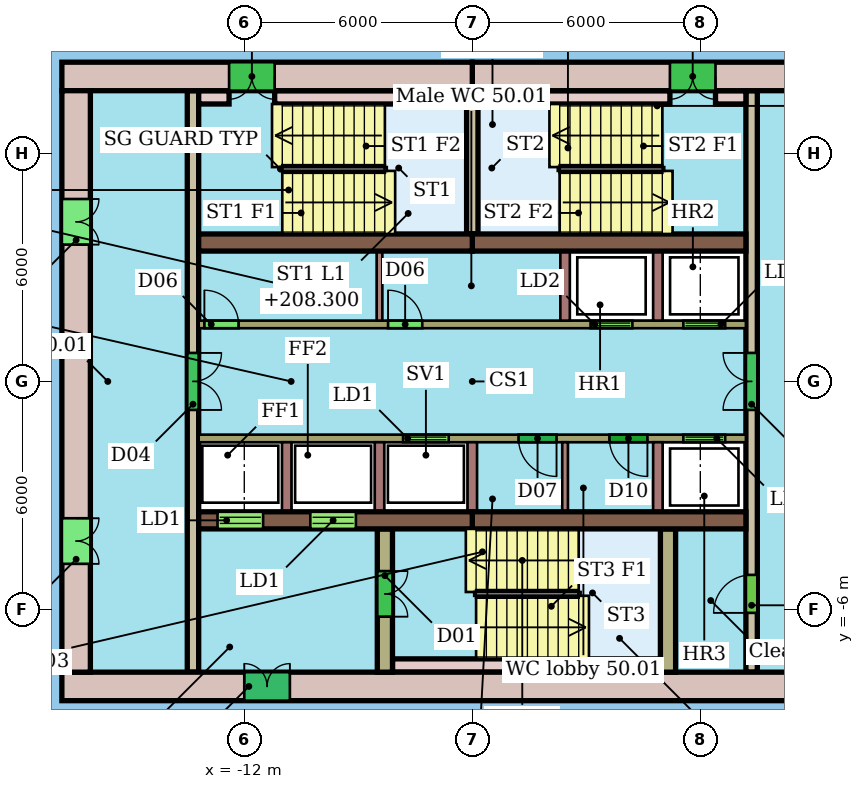
"""IFC4 building model, lengths in metres.
Left out: names, types, materials, properties, quantities, classifications, styles, units other than length and angle.
Written with IfcOpenShell. Run it as: python <this file> out.ifc"""

import sys

from ifc_helpers import new_model, si_unit, direction, frame, frame_2d, origin, place, context, subcontext, project, spatial, rectangle, extrude, element, fill, save


model = new_model("IFC4")
c1 = context("Model", 3, precision=1e-05, world=origin(), true_north=direction((0.0, 1.0)))
c2 = subcontext(c1, "Body", "Model", "MODEL_VIEW")
j1 = project(units=[si_unit("LENGTHUNIT", "METRE"), si_unit("PLANEANGLEUNIT", "RADIAN")], contexts=[c1])
p1 = place(None, origin())
s1 = spatial("IfcSite", under=j1, at=p1, CompositionType="ELEMENT")
p2 = place(p1, origin())
s2 = spatial("IfcBuilding", under=s1, at=p2, CompositionType="ELEMENT")
p3 = place(p2, frame((0.0, 0.0, 206.5)))
s3 = spatial("IfcBuildingStorey", under=s2, at=p3, CompositionType="ELEMENT", Elevation=206.5)
p4 = place(p3, frame((4.8, 8.025, 0.0), z_axis=(0.0, 0.0, 1.0), x_axis=(-1.0, 0.0, 0.0)))
e1 = element("IfcWall", 1, at=p4, inside=s3, PredefinedType="SHEAR", context=c2, shape_type="SweptSolid", body=[
    extrude(rectangle(XDim=10.8, YDim=0.75, at=frame_2d((5.4, 0.0))), origin(), (0.0, 0.0, 1.0), 3.3),
])
p5 = place(p4, frame((4.4, 0.0, 0.0)))
e2 = element("IfcOpeningElement", 2, at=p5, cuts=e1, PredefinedType="OPENING", context=c2, shape_type="SweptSolid", body=[
    extrude(rectangle(XDim=1.2, YDim=2.1, at=frame_2d((0.6, 1.05))), frame((0.0, 0.385, 0.0), z_axis=(0.0, -1.0, 0.0), x_axis=(1.0, 0.0, 0.0)), (0.0, 0.0, 1.0), 0.77),
])
p6 = place(p3, frame((-6.0, 8.025, 0.0), z_axis=(0.0, 0.0, 1.0), x_axis=(-1.0, 0.0, 0.0)))
e3 = element("IfcWall", 3, at=p6, inside=s3, PredefinedType="SHEAR", context=c2, shape_type="SweptSolid", body=[
    extrude(rectangle(XDim=10.8, YDim=0.75, at=frame_2d((5.4, 0.0))), origin(), (0.0, 0.0, 1.0), 3.3),
])
p7 = place(p6, frame((5.2, 0.0, 0.0)))
e4 = element("IfcOpeningElement", 4, at=p7, cuts=e3, PredefinedType="OPENING", context=c2, shape_type="SweptSolid", body=[
    extrude(rectangle(XDim=1.2, YDim=2.1, at=frame_2d((0.6, 1.05))), frame((0.0, 0.385, 0.0), z_axis=(0.0, -1.0, 0.0), x_axis=(1.0, 0.0, 0.0)), (0.0, 0.0, 1.0), 0.77),
])
p8 = place(p3, frame((-16.8, -8.025, 0.0), z_axis=(0.0, 0.0, 1.0), x_axis=(1.0, 0.0, 0.0)))
e5 = element("IfcWall", 5, at=p8, inside=s3, PredefinedType="SHEAR", context=c2, shape_type="SweptSolid", body=[
    extrude(rectangle(XDim=21.6, YDim=0.75, at=frame_2d((10.8, 0.0))), origin(), (0.0, 0.0, 1.0), 3.3),
])
p9 = place(p8, frame((4.8, 0.0, 0.0)))
e6 = element("IfcOpeningElement", 6, at=p9, cuts=e5, PredefinedType="OPENING", context=c2, shape_type="SweptSolid", body=[
    extrude(rectangle(XDim=1.2, YDim=2.1, at=frame_2d((0.6, 1.05))), frame((0.0, 0.385, 0.0), z_axis=(0.0, -1.0, 0.0), x_axis=(1.0, 0.0, 0.0)), (0.0, 0.0, 1.0), 0.77),
])
p10 = place(p3, frame((-16.425, 7.65, 0.0), z_axis=(0.0, 0.0, 1.0), x_axis=(0.0, -1.0, 0.0)))
e7 = element("IfcWall", 7, at=p10, inside=s3, PredefinedType="SHEAR", context=c2, shape_type="SweptSolid", body=[
    extrude(rectangle(XDim=15.3, YDim=0.75, at=frame_2d((7.65, 0.0))), origin(), (0.0, 0.0, 1.0), 3.3),
])
p11 = place(p10, frame((11.25, 0.0, 0.0)))
e8 = element("IfcOpeningElement", 8, at=p11, cuts=e7, PredefinedType="OPENING", context=c2, shape_type="SweptSolid", body=[
    extrude(rectangle(XDim=1.2, YDim=2.1, at=frame_2d((0.6, 1.05))), frame((0.0, 0.385, 0.0), z_axis=(0.0, -1.0, 0.0), x_axis=(1.0, 0.0, 0.0)), (0.0, 0.0, 1.0), 0.77),
])
p12 = place(p10, frame((2.85, 0.0, 0.0)))
e9 = element("IfcOpeningElement", 9, at=p12, cuts=e7, PredefinedType="OPENING", context=c2, shape_type="SweptSolid", body=[
    extrude(rectangle(XDim=1.2, YDim=2.1, at=frame_2d((0.6, 1.05))), frame((0.0, 0.385, 0.0), z_axis=(0.0, -1.0, 0.0), x_axis=(1.0, 0.0, 0.0)), (0.0, 0.0, 1.0), 0.77),
])
for number, where, z_axis, x_axis in (
    (10, (-13.2, 3.655, 0.0), (0.0, 0.0, 1.0), (1.0, 0.0, 0.0)),
    (11, (-6.0, 3.655, 0.0), (0.0, 0.0, 1.0), (1.0, 0.0, 0.0)),
):
    element("IfcWall", number, at=place(p3, frame(where, z_axis=z_axis, x_axis=x_axis)), inside=s3, PredefinedType="SHEAR", context=c2, shape_type="SweptSolid", body=[
        extrude(rectangle(XDim=7.2, YDim=0.45, at=frame_2d((3.6, 0.0))), origin(), (0.0, 0.0, 1.0), 3.3),
    ])
p13 = place(p3, frame((-13.2, -3.655, 0.0), z_axis=(0.0, 0.0, 1.0), x_axis=(1.0, 0.0, 0.0)))
e12 = element("IfcWall", 12, at=p13, inside=s3, PredefinedType="SHEAR", context=c2, shape_type="SweptSolid", body=[
    extrude(rectangle(XDim=7.2, YDim=0.45, at=frame_2d((3.6, 0.0))), origin(), (0.0, 0.0, 1.0), 3.3),
])
p14 = place(p13, frame((0.496, 0.0, 0.0)))
e13 = element("IfcOpeningElement", 13, at=p14, cuts=e12, PredefinedType="OPENING", context=c2, shape_type="SweptSolid", body=[
    extrude(rectangle(XDim=1.2, YDim=2.1, at=frame_2d((0.6, 1.05))), frame((0.0, 0.235, 0.0), z_axis=(0.0, -1.0, 0.0), x_axis=(1.0, 0.0, 0.0)), (0.0, 0.0, 1.0), 0.47),
])
p15 = place(p13, frame((2.938, 0.0, 0.0)))
e14 = element("IfcOpeningElement", 14, at=p15, cuts=e12, PredefinedType="OPENING", context=c2, shape_type="SweptSolid", body=[
    extrude(rectangle(XDim=1.2, YDim=2.1, at=frame_2d((0.6, 1.05))), frame((0.0, 0.235, 0.0), z_axis=(0.0, -1.0, 0.0), x_axis=(1.0, 0.0, 0.0)), (0.0, 0.0, 1.0), 0.47),
])
p16 = place(p3, frame((-6.0, -3.655, 0.0), z_axis=(0.0, 0.0, 1.0), x_axis=(1.0, 0.0, 0.0)))
e15 = element("IfcWall", 15, at=p16, inside=s3, PredefinedType="SHEAR", context=c2, shape_type="SweptSolid", body=[
    extrude(rectangle(XDim=7.2, YDim=0.45, at=frame_2d((3.6, 0.0))), origin(), (0.0, 0.0, 1.0), 3.3),
])
p17 = place(p3, frame((-13.35, 7.65, 0.0), z_axis=(0.0, 0.0, 1.0), x_axis=(0.0, -1.0, 0.0)))
e16 = element("IfcWall", 16, at=p17, inside=s3, PredefinedType="SHEAR", context=c2, shape_type="SweptSolid", body=[
    extrude(rectangle(XDim=15.3, YDim=0.3, at=frame_2d((7.65, 0.0))), origin(), (0.0, 0.0, 1.0), 3.3),
])
p18 = place(p17, frame((6.9, 0.0, 0.0)))
e17 = element("IfcOpeningElement", 17, at=p18, cuts=e16, PredefinedType="OPENING", context=c2, shape_type="SweptSolid", body=[
    extrude(rectangle(XDim=1.5, YDim=2.1, at=frame_2d((0.75, 1.05))), frame((0.0, 0.16, 0.0), z_axis=(0.0, -1.0, 0.0), x_axis=(1.0, 0.0, 0.0)), (0.0, 0.0, 1.0), 0.32),
])
p19 = place(p3, frame((1.35, -7.65, 0.0), z_axis=(0.0, 0.0, 1.0), x_axis=(0.0, 1.0, 0.0)))
e18 = element("IfcWall", 18, at=p19, inside=s3, PredefinedType="SHEAR", context=c2, shape_type="SweptSolid", body=[
    extrude(rectangle(XDim=15.3, YDim=0.3, at=frame_2d((7.65, 0.0))), origin(), (0.0, 0.0, 1.0), 3.3),
])
p20 = place(p19, frame((1.56, 0.0, 0.0)))
e19 = element("IfcOpeningElement", 19, at=p20, cuts=e18, PredefinedType="OPENING", context=c2, shape_type="SweptSolid", body=[
    extrude(rectangle(XDim=1.0, YDim=2.1, at=frame_2d((0.5, 1.05))), frame((0.0, 0.16, 0.0), z_axis=(0.0, -1.0, 0.0), x_axis=(1.0, 0.0, 0.0)), (0.0, 0.0, 1.0), 0.32),
])
p21 = place(p19, frame((6.9, 0.0, 0.0)))
e20 = element("IfcOpeningElement", 20, at=p21, cuts=e18, PredefinedType="OPENING", context=c2, shape_type="SweptSolid", body=[
    extrude(rectangle(XDim=1.5, YDim=2.1, at=frame_2d((0.75, 1.05))), frame((0.0, 0.16, 0.0), z_axis=(0.0, -1.0, 0.0), x_axis=(1.0, 0.0, 0.0)), (0.0, 0.0, 1.0), 0.32),
])
p22 = place(p3, frame((-13.2, 1.5, 0.0), z_axis=(0.0, 0.0, 1.0), x_axis=(1.0, 0.0, 0.0)))
e21 = element("IfcWall", 21, at=p22, inside=s3, PredefinedType="SHEAR", context=c2, shape_type="SweptSolid", body=[
    extrude(rectangle(XDim=14.4, YDim=0.2, at=frame_2d((7.2, 0.0))), origin(), (0.0, 0.0, 1.0), 3.3),
])
p23 = place(p22, frame((10.312, 0.0, 0.0)))
e22 = element("IfcOpeningElement", 22, at=p23, cuts=e21, PredefinedType="OPENING", context=c2, shape_type="SweptSolid", body=[
    extrude(rectangle(XDim=1.1, YDim=2.1, at=frame_2d((0.55, 1.05))), frame((0.0, 0.11, 0.0), z_axis=(0.0, -1.0, 0.0), x_axis=(1.0, 0.0, 0.0)), (0.0, 0.0, 1.0), 0.22),
])
p24 = place(p22, frame((12.754, 0.0, 0.0)))
e23 = element("IfcOpeningElement", 23, at=p24, cuts=e21, PredefinedType="OPENING", context=c2, shape_type="SweptSolid", body=[
    extrude(rectangle(XDim=1.1, YDim=2.1, at=frame_2d((0.55, 1.05))), frame((0.0, 0.11, 0.0), z_axis=(0.0, -1.0, 0.0), x_axis=(1.0, 0.0, 0.0)), (0.0, 0.0, 1.0), 0.22),
])
p25 = place(p22, frame((0.15, 0.0, 0.0)))
e24 = element("IfcOpeningElement", 24, at=p25, cuts=e21, PredefinedType="OPENING", context=c2, shape_type="SweptSolid", body=[
    extrude(rectangle(XDim=0.9, YDim=2.1, at=frame_2d((0.45, 1.05))), frame((0.0, 0.11, 0.0), z_axis=(0.0, -1.0, 0.0), x_axis=(1.0, 0.0, 0.0)), (0.0, 0.0, 1.0), 0.22),
])
p26 = place(p22, frame((4.983, 0.0, 0.0)))
e25 = element("IfcOpeningElement", 25, at=p26, cuts=e21, PredefinedType="OPENING", context=c2, shape_type="SweptSolid", body=[
    extrude(rectangle(XDim=0.9, YDim=2.1, at=frame_2d((0.45, 1.05))), frame((0.0, 0.11, 0.0), z_axis=(0.0, -1.0, 0.0), x_axis=(1.0, 0.0, 0.0)), (0.0, 0.0, 1.0), 0.22),
])
p27 = place(p3, frame((1.2, -1.5, 0.0), z_axis=(0.0, 0.0, 1.0), x_axis=(-1.0, 0.0, 0.0)))
e26 = element("IfcWall", 26, at=p27, inside=s3, PredefinedType="SHEAR", context=c2, shape_type="SweptSolid", body=[
    extrude(rectangle(XDim=14.4, YDim=0.2, at=frame_2d((7.2, 0.0))), origin(), (0.0, 0.0, 1.0), 3.3),
])
p28 = place(p27, frame((7.821, 0.0, 0.0)))
e27 = element("IfcOpeningElement", 27, at=p28, cuts=e26, PredefinedType="OPENING", context=c2, shape_type="SweptSolid", body=[
    extrude(rectangle(XDim=1.2, YDim=2.1, at=frame_2d((0.6, 1.05))), frame((0.0, 0.11, 0.0), z_axis=(0.0, -1.0, 0.0), x_axis=(1.0, 0.0, 0.0)), (0.0, 0.0, 1.0), 0.22),
])
p29 = place(p27, frame((0.546, 0.0, 0.0)))
e28 = element("IfcOpeningElement", 28, at=p29, cuts=e26, PredefinedType="OPENING", context=c2, shape_type="SweptSolid", body=[
    extrude(rectangle(XDim=1.1, YDim=2.1, at=frame_2d((0.55, 1.05))), frame((0.0, 0.11, 0.0), z_axis=(0.0, -1.0, 0.0), x_axis=(1.0, 0.0, 0.0)), (0.0, 0.0, 1.0), 0.22),
])
p30 = place(p27, frame((4.983, 0.0, 0.0)))
e29 = element("IfcOpeningElement", 29, at=p30, cuts=e26, PredefinedType="OPENING", context=c2, shape_type="SweptSolid", body=[
    extrude(rectangle(XDim=1.0, YDim=2.1, at=frame_2d((0.5, 1.05))), frame((0.0, 0.11, 0.0), z_axis=(0.0, -1.0, 0.0), x_axis=(1.0, 0.0, 0.0)), (0.0, 0.0, 1.0), 0.22),
])
p31 = place(p27, frame((2.592, 0.0, 0.0)))
e30 = element("IfcOpeningElement", 30, at=p31, cuts=e26, PredefinedType="OPENING", context=c2, shape_type="SweptSolid", body=[
    extrude(rectangle(XDim=1.0, YDim=2.1, at=frame_2d((0.5, 1.05))), frame((0.0, 0.11, 0.0), z_axis=(0.0, -1.0, 0.0), x_axis=(1.0, 0.0, 0.0)), (0.0, 0.0, 1.0), 0.22),
])
p32 = place(p3, frame((-8.3, -3.88, 0.0), z_axis=(0.0, 0.0, 1.0), x_axis=(0.0, -1.0, 0.0)))
e31 = element("IfcWall", 31, at=p32, inside=s3, PredefinedType="SHEAR", context=c2, shape_type="SweptSolid", body=[
    extrude(rectangle(XDim=3.77, YDim=0.4, at=frame_2d((1.885, 0.0))), origin(), (0.0, 0.0, 1.0), 3.3),
])
p33 = place(p32, frame((1.11, 0.0, 0.0)))
e32 = element("IfcOpeningElement", 32, at=p33, cuts=e31, PredefinedType="OPENING", context=c2, shape_type="SweptSolid", body=[
    extrude(rectangle(XDim=1.2, YDim=2.1, at=frame_2d((0.6, 1.05))), frame((0.0, 0.21, 0.0), z_axis=(0.0, -1.0, 0.0), x_axis=(1.0, 0.0, 0.0)), (0.0, 0.0, 1.0), 0.42),
])
p34 = place(p3, frame((-0.85, -3.88, 0.0), z_axis=(0.0, 0.0, 1.0), x_axis=(0.0, -1.0, 0.0)))
e33 = element("IfcWall", 33, at=p34, inside=s3, PredefinedType="SHEAR", context=c2, shape_type="SweptSolid", body=[
    extrude(rectangle(XDim=3.77, YDim=0.4, at=frame_2d((1.885, 0.0))), origin(), (0.0, 0.0, 1.0), 3.3),
])
p35 = place(p3, frame((-6.0, 3.88, 0.0), z_axis=(0.0, 0.0, 1.0), x_axis=(0.0, 1.0, 0.0)))
e34 = element("IfcWall", 34, at=p35, inside=s3, PredefinedType="SHEAR", context=c2, shape_type="SweptSolid", body=[
    extrude(rectangle(XDim=3.77, YDim=0.3, at=frame_2d((1.885, 0.0))), origin(), (0.0, 0.0, 1.0), 3.3),
])
p36 = place(p3, frame((-13.2, 7.475, 0.0), z_axis=(0.0, 0.0, 1.0), x_axis=(1.0, 0.0, 0.0)))
e35 = element("IfcWall", 35, at=p36, inside=s3, PredefinedType="SHEAR", context=c2, shape_type="SweptSolid", body=[
    extrude(rectangle(XDim=0.8, YDim=0.35, at=frame_2d((0.4, 0.0))), origin(), (0.0, 0.0, 1.0), 3.3),
])
for number, where, z_axis, x_axis in (
    (36, (-11.2, 7.475, 0.0), (0.0, 0.0, 1.0), (1.0, 0.0, 0.0)),
    (37, (-5.85, 7.475, 0.0), (0.0, 0.0, 1.0), (1.0, 0.0, 0.0)),
):
    element("IfcWall", number, at=place(p3, frame(where, z_axis=z_axis, x_axis=x_axis)), inside=s3, PredefinedType="SHEAR", context=c2, shape_type="SweptSolid", body=[
        extrude(rectangle(XDim=5.05, YDim=0.35, at=frame_2d((2.525, 0.0))), origin(), (0.0, 0.0, 1.0), 3.3),
    ])
p37 = place(p3, frame((0.4, 7.475, 0.0), z_axis=(0.0, 0.0, 1.0), x_axis=(1.0, 0.0, 0.0)))
e38 = element("IfcWall", 38, at=p37, inside=s3, PredefinedType="SHEAR", context=c2, shape_type="SweptSolid", body=[
    extrude(rectangle(XDim=0.8, YDim=0.35, at=frame_2d((0.4, 0.0))), origin(), (0.0, 0.0, 1.0), 3.3),
])
p38 = place(p3, frame((-8.1, -7.475, 0.0), z_axis=(0.0, 0.0, 1.0), x_axis=(1.0, 0.0, 0.0)))
e39 = element("IfcWall", 39, at=p38, inside=s3, PredefinedType="SHEAR", context=c2, shape_type="SweptSolid", body=[
    extrude(rectangle(XDim=7.05, YDim=0.35, at=frame_2d((3.525, 0.0))), origin(), (0.0, 0.0, 1.0), 3.3),
])
for number, where, z_axis, x_axis in (
    (40, (-3.558, 1.6, 0.0), (0.0, 0.0, 1.0), (0.0, 1.0, 0.0)),
    (41, (-1.117, 1.6, 0.0), (0.0, 0.0, 1.0), (0.0, 1.0, 0.0)),
):
    element("IfcWall", number, at=place(p3, frame(where, z_axis=z_axis, x_axis=x_axis)), inside=s3, PredefinedType="SHEAR", context=c2, shape_type="SweptSolid", body=[
        extrude(rectangle(XDim=1.83, YDim=0.25, at=frame_2d((0.915, 0.0))), origin(), (0.0, 0.0, 1.0), 3.3),
    ])
p39 = place(p3, frame((-8.442, 1.6, 0.0), z_axis=(0.0, 0.0, 1.0), x_axis=(0.0, 1.0, 0.0)))
e42 = element("IfcWall", 42, at=p39, inside=s3, PredefinedType="PARTITIONING", context=c2, shape_type="SweptSolid", body=[
    extrude(rectangle(XDim=1.83, YDim=0.15, at=frame_2d((0.915, 0.0))), origin(), (0.0, 0.0, 1.0), 3.3),
])
for number, where, z_axis, x_axis in (
    (43, (-10.883, -1.6, 0.0), (0.0, 0.0, 1.0), (0.0, -1.0, 0.0)),
    (44, (-8.442, -1.6, 0.0), (0.0, 0.0, 1.0), (0.0, -1.0, 0.0)),
    (45, (-6.0, -1.6, 0.0), (0.0, 0.0, 1.0), (0.0, -1.0, 0.0)),
    (46, (-1.117, -1.6, 0.0), (0.0, 0.0, 1.0), (0.0, -1.0, 0.0)),
):
    element("IfcWall", number, at=place(p3, frame(where, z_axis=z_axis, x_axis=x_axis)), inside=s3, PredefinedType="SHEAR", context=c2, shape_type="SweptSolid", body=[
        extrude(rectangle(XDim=1.83, YDim=0.25, at=frame_2d((0.915, 0.0))), origin(), (0.0, 0.0, 1.0), 3.3),
    ])
p40 = place(p3, frame((-3.558, -1.6, 0.0), z_axis=(0.0, 0.0, 1.0), x_axis=(0.0, -1.0, 0.0)))
e47 = element("IfcWall", 47, at=p40, inside=s3, PredefinedType="PARTITIONING", context=c2, shape_type="SweptSolid", body=[
    extrude(rectangle(XDim=1.83, YDim=0.15, at=frame_2d((0.915, 0.0))), origin(), (0.0, 0.0, 1.0), 3.3),
])
p41 = place(p5, origin())
e48 = element("IfcDoor", 48, at=p41, inside=s3, OperationType="DOUBLE_DOOR_SINGLE_SWING", PredefinedType="NOTDEFINED", context=c2, shape_type="SweptSolid", body=[
    extrude(rectangle(XDim=1.2, YDim=2.1, at=frame_2d((0.6, 1.05))), frame((0.0, 0.025, 0.0), z_axis=(0.0, -1.0, 0.0), x_axis=(1.0, 0.0, 0.0)), (0.0, 0.0, 1.0), 0.05),
])
fill(e2, e48)
p42 = place(p7, origin())
e49 = element("IfcDoor", 49, at=p42, inside=s3, OperationType="DOUBLE_DOOR_SINGLE_SWING", PredefinedType="NOTDEFINED", context=c2, shape_type="SweptSolid", body=[
    extrude(rectangle(XDim=1.2, YDim=2.1, at=frame_2d((0.6, 1.05))), frame((0.0, 0.025, 0.0), z_axis=(0.0, -1.0, 0.0), x_axis=(1.0, 0.0, 0.0)), (0.0, 0.0, 1.0), 0.05),
])
fill(e4, e49)
p43 = place(p9, origin())
e50 = element("IfcDoor", 50, at=p43, inside=s3, OperationType="DOUBLE_DOOR_SINGLE_SWING", PredefinedType="NOTDEFINED", context=c2, shape_type="SweptSolid", body=[
    extrude(rectangle(XDim=1.2, YDim=2.1, at=frame_2d((0.6, 1.05))), frame((0.0, 0.025, 0.0), z_axis=(0.0, -1.0, 0.0), x_axis=(1.0, 0.0, 0.0)), (0.0, 0.0, 1.0), 0.05),
])
fill(e6, e50)
p44 = place(p11, origin())
e51 = element("IfcDoor", 51, at=p44, inside=s3, OperationType="DOUBLE_DOOR_SINGLE_SWING", PredefinedType="NOTDEFINED", context=c2, shape_type="SweptSolid", body=[
    extrude(rectangle(XDim=1.2, YDim=2.1, at=frame_2d((0.6, 1.05))), frame((0.0, 0.025, 0.0), z_axis=(0.0, -1.0, 0.0), x_axis=(1.0, 0.0, 0.0)), (0.0, 0.0, 1.0), 0.05),
])
fill(e8, e51)
p45 = place(p12, origin())
e52 = element("IfcDoor", 52, at=p45, inside=s3, OperationType="DOUBLE_DOOR_SINGLE_SWING", PredefinedType="NOTDEFINED", context=c2, shape_type="SweptSolid", body=[
    extrude(rectangle(XDim=1.2, YDim=2.1, at=frame_2d((0.6, 1.05))), frame((0.0, 0.025, 0.0), z_axis=(0.0, -1.0, 0.0), x_axis=(1.0, 0.0, 0.0)), (0.0, 0.0, 1.0), 0.05),
])
fill(e9, e52)
p46 = place(p14, origin())
e53 = element("IfcDoor", 53, at=p46, inside=s3, OperationType="DOUBLE_DOOR_SLIDING", PredefinedType="NOTDEFINED", context=c2, shape_type="SweptSolid", body=[
    extrude(rectangle(XDim=1.2, YDim=2.1, at=frame_2d((0.6, 1.05))), frame((0.0, 0.025, 0.0), z_axis=(0.0, -1.0, 0.0), x_axis=(1.0, 0.0, 0.0)), (0.0, 0.0, 1.0), 0.05),
])
fill(e13, e53)
p47 = place(p15, origin())
e54 = element("IfcDoor", 54, at=p47, inside=s3, OperationType="DOUBLE_DOOR_SLIDING", PredefinedType="NOTDEFINED", context=c2, shape_type="SweptSolid", body=[
    extrude(rectangle(XDim=1.2, YDim=2.1, at=frame_2d((0.6, 1.05))), frame((0.0, 0.025, 0.0), z_axis=(0.0, -1.0, 0.0), x_axis=(1.0, 0.0, 0.0)), (0.0, 0.0, 1.0), 0.05),
])
fill(e14, e54)
p48 = place(p18, origin())
e55 = element("IfcDoor", 55, at=p48, inside=s3, OperationType="DOUBLE_DOOR_SINGLE_SWING", PredefinedType="NOTDEFINED", context=c2, shape_type="SweptSolid", body=[
    extrude(rectangle(XDim=1.5, YDim=2.1, at=frame_2d((0.75, 1.05))), frame((0.0, 0.025, 0.0), z_axis=(0.0, -1.0, 0.0), x_axis=(1.0, 0.0, 0.0)), (0.0, 0.0, 1.0), 0.05),
])
fill(e17, e55)
p49 = place(p20, origin())
e56 = element("IfcDoor", 56, at=p49, inside=s3, OperationType="SINGLE_SWING_LEFT", PredefinedType="NOTDEFINED", context=c2, shape_type="SweptSolid", body=[
    extrude(rectangle(XDim=1.0, YDim=2.1, at=frame_2d((0.5, 1.05))), frame((0.0, 0.025, 0.0), z_axis=(0.0, -1.0, 0.0), x_axis=(1.0, 0.0, 0.0)), (0.0, 0.0, 1.0), 0.05),
])
fill(e19, e56)
p50 = place(p21, origin())
e57 = element("IfcDoor", 57, at=p50, inside=s3, OperationType="DOUBLE_DOOR_SINGLE_SWING", PredefinedType="NOTDEFINED", context=c2, shape_type="SweptSolid", body=[
    extrude(rectangle(XDim=1.5, YDim=2.1, at=frame_2d((0.75, 1.05))), frame((0.0, 0.025, 0.0), z_axis=(0.0, -1.0, 0.0), x_axis=(1.0, 0.0, 0.0)), (0.0, 0.0, 1.0), 0.05),
])
fill(e20, e57)
p51 = place(p23, origin())
e58 = element("IfcDoor", 58, at=p51, inside=s3, OperationType="DOUBLE_DOOR_SLIDING", PredefinedType="NOTDEFINED", context=c2, shape_type="SweptSolid", body=[
    extrude(rectangle(XDim=1.1, YDim=2.1, at=frame_2d((0.55, 1.05))), frame((0.0, 0.025, 0.0), z_axis=(0.0, -1.0, 0.0), x_axis=(1.0, 0.0, 0.0)), (0.0, 0.0, 1.0), 0.05),
])
fill(e22, e58)
p52 = place(p24, origin())
e59 = element("IfcDoor", 59, at=p52, inside=s3, OperationType="DOUBLE_DOOR_SLIDING", PredefinedType="NOTDEFINED", context=c2, shape_type="SweptSolid", body=[
    extrude(rectangle(XDim=1.1, YDim=2.1, at=frame_2d((0.55, 1.05))), frame((0.0, 0.025, 0.0), z_axis=(0.0, -1.0, 0.0), x_axis=(1.0, 0.0, 0.0)), (0.0, 0.0, 1.0), 0.05),
])
fill(e23, e59)
p53 = place(p25, origin())
e60 = element("IfcDoor", 60, at=p53, inside=s3, OperationType="SINGLE_SWING_LEFT", PredefinedType="NOTDEFINED", context=c2, shape_type="SweptSolid", body=[
    extrude(rectangle(XDim=0.9, YDim=2.1, at=frame_2d((0.45, 1.05))), frame((0.0, 0.025, 0.0), z_axis=(0.0, -1.0, 0.0), x_axis=(1.0, 0.0, 0.0)), (0.0, 0.0, 1.0), 0.05),
])
fill(e24, e60)
p54 = place(p26, origin())
e61 = element("IfcDoor", 61, at=p54, inside=s3, OperationType="SINGLE_SWING_LEFT", PredefinedType="NOTDEFINED", context=c2, shape_type="SweptSolid", body=[
    extrude(rectangle(XDim=0.9, YDim=2.1, at=frame_2d((0.45, 1.05))), frame((0.0, 0.025, 0.0), z_axis=(0.0, -1.0, 0.0), x_axis=(1.0, 0.0, 0.0)), (0.0, 0.0, 1.0), 0.05),
])
fill(e25, e61)
p55 = place(p28, origin())
e62 = element("IfcDoor", 62, at=p55, inside=s3, OperationType="DOUBLE_DOOR_SLIDING", PredefinedType="NOTDEFINED", context=c2, shape_type="SweptSolid", body=[
    extrude(rectangle(XDim=1.2, YDim=2.1, at=frame_2d((0.6, 1.05))), frame((0.0, 0.025, 0.0), z_axis=(0.0, -1.0, 0.0), x_axis=(1.0, 0.0, 0.0)), (0.0, 0.0, 1.0), 0.05),
])
fill(e27, e62)
p56 = place(p29, origin())
e63 = element("IfcDoor", 63, at=p56, inside=s3, OperationType="DOUBLE_DOOR_SLIDING", PredefinedType="NOTDEFINED", context=c2, shape_type="SweptSolid", body=[
    extrude(rectangle(XDim=1.1, YDim=2.1, at=frame_2d((0.55, 1.05))), frame((0.0, 0.025, 0.0), z_axis=(0.0, -1.0, 0.0), x_axis=(1.0, 0.0, 0.0)), (0.0, 0.0, 1.0), 0.05),
])
fill(e28, e63)
p57 = place(p30, origin())
e64 = element("IfcDoor", 64, at=p57, inside=s3, OperationType="SINGLE_SWING_LEFT", PredefinedType="NOTDEFINED", context=c2, shape_type="SweptSolid", body=[
    extrude(rectangle(XDim=1.0, YDim=2.1, at=frame_2d((0.5, 1.05))), frame((0.0, 0.025, 0.0), z_axis=(0.0, -1.0, 0.0), x_axis=(1.0, 0.0, 0.0)), (0.0, 0.0, 1.0), 0.05),
])
fill(e29, e64)
p58 = place(p31, origin())
e65 = element("IfcDoor", 65, at=p58, inside=s3, OperationType="SINGLE_SWING_LEFT", PredefinedType="NOTDEFINED", context=c2, shape_type="SweptSolid", body=[
    extrude(rectangle(XDim=1.0, YDim=2.1, at=frame_2d((0.5, 1.05))), frame((0.0, 0.025, 0.0), z_axis=(0.0, -1.0, 0.0), x_axis=(1.0, 0.0, 0.0)), (0.0, 0.0, 1.0), 0.05),
])
fill(e30, e65)
p59 = place(p33, origin())
e66 = element("IfcDoor", 66, at=p59, inside=s3, OperationType="DOUBLE_DOOR_SINGLE_SWING", PredefinedType="NOTDEFINED", context=c2, shape_type="SweptSolid", body=[
    extrude(rectangle(XDim=1.2, YDim=2.1, at=frame_2d((0.6, 1.05))), frame((0.0, 0.025, 0.0), z_axis=(0.0, -1.0, 0.0), x_axis=(1.0, 0.0, 0.0)), (0.0, 0.0, 1.0), 0.05),
])
fill(e32, e66)
save(model, sys.argv[1])
